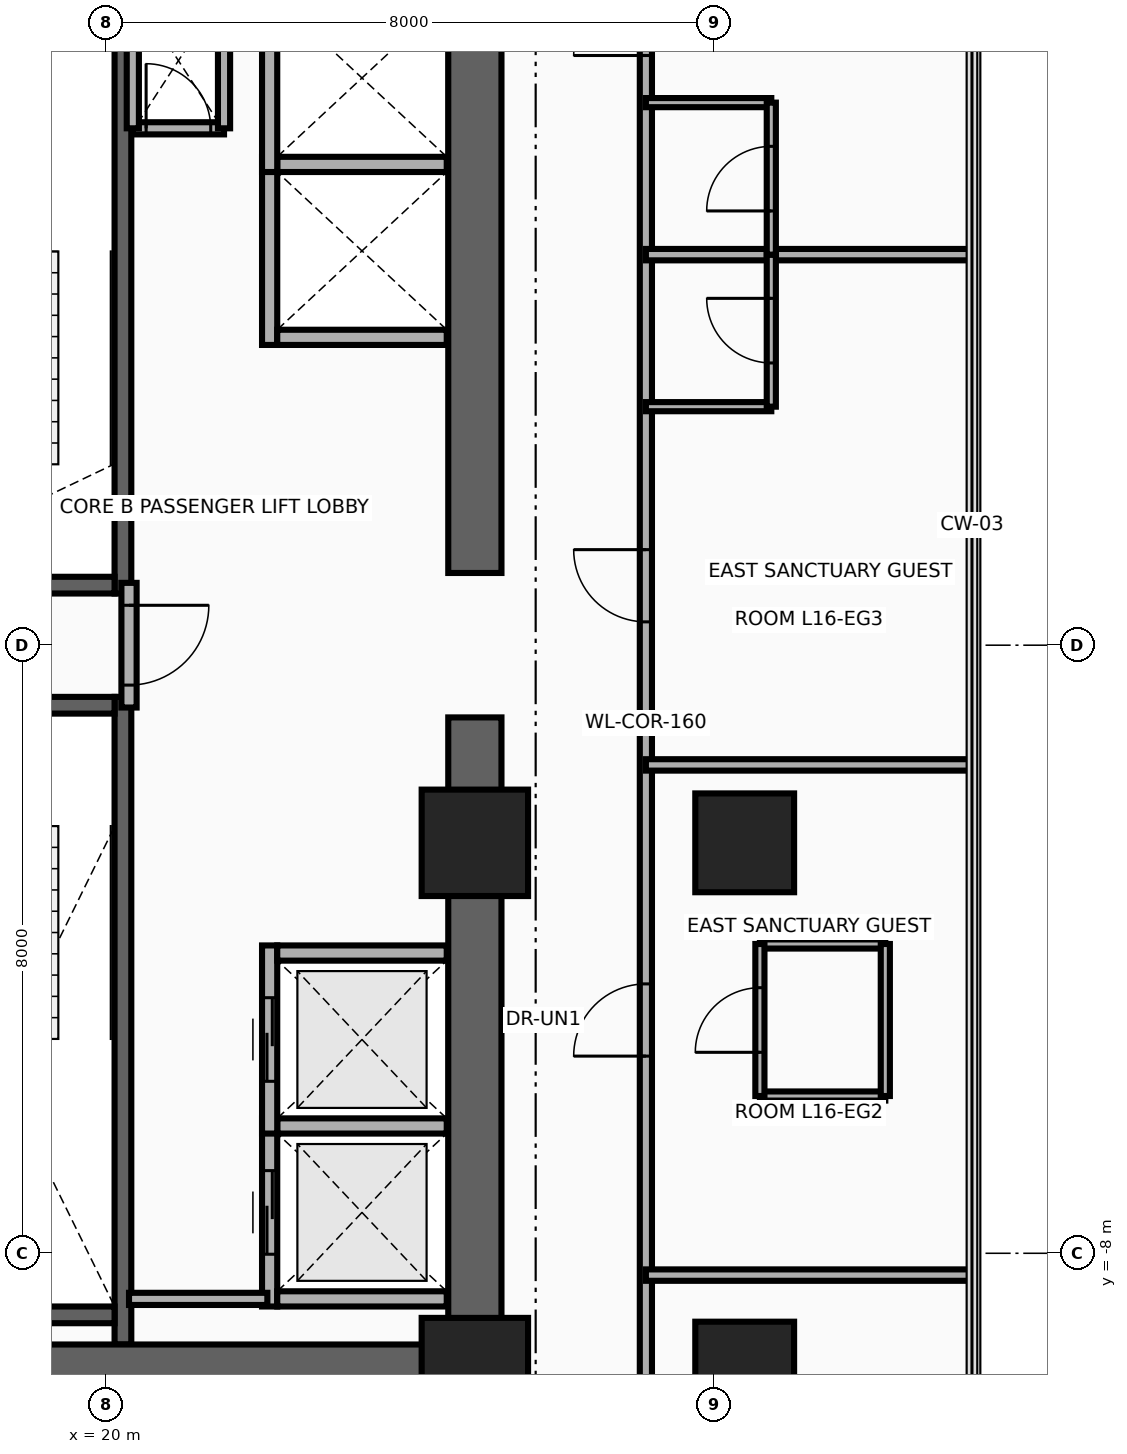
"""IFC4 building model, lengths in metres.
Left out: names, types, materials, properties, quantities, classifications, styles, units other than length and angle.
Written with IfcOpenShell. Run it as: python <this file> out.ifc"""

import sys

from ifc_helpers import new_model, si_unit, direction, frame, frame_2d, origin, origin_2d, place, context, subcontext, project, spatial, rectangle, circle, extrude, source, transform, mapped, element, fill, save


model = new_model("IFC4")
c1 = context("Model", 3, precision=1e-05, world=origin(), true_north=direction((0.0, 1.0)))
c2 = subcontext(c1, "Body", "Model", "MODEL_VIEW")
j1 = project(units=[si_unit("LENGTHUNIT", "METRE"), si_unit("PLANEANGLEUNIT", "RADIAN")], contexts=[c1])
p1 = place(None, origin())
s1 = spatial("IfcSite", under=j1, at=p1, CompositionType="ELEMENT")
p2 = place(p1, origin())
s2 = spatial("IfcBuilding", under=s1, at=p2, CompositionType="ELEMENT")
p3 = place(p2, frame((0.0, 0.0, 66.7)))
s3 = spatial("IfcBuildingStorey", under=s2, at=p3, CompositionType="ELEMENT", Elevation=66.7)
p4 = place(p3, frame((20.22, 0.68, 0.0), z_axis=(0.0, 0.0, 1.0), x_axis=(0.0, 1.0, 0.0)))
e1 = element("IfcWall", 1, at=p4, inside=s3, PredefinedType="SHEAR", context=c2, shape_type="SweptSolid", body=[
    extrude(rectangle(XDim=8.52, YDim=0.22, at=frame_2d((4.26, 0.0))), origin(), (0.0, 0.0, 1.0), 3.46),
])
p5 = place(p3, frame((17.0, 0.79, 0.0), z_axis=(0.0, 0.0, 1.0), x_axis=(1.0, 0.0, 0.0)))
e2 = element("IfcWall", 2, at=p5, inside=s3, PredefinedType="SHEAR", context=c2, shape_type="SweptSolid", body=[
    extrude(rectangle(XDim=3.11, YDim=0.22, at=frame_2d((1.555, 0.0))), origin(), (0.0, 0.0, 1.0), 3.46),
])
p6 = place(p5, frame((0.95, 0.0, 0.0)))
e3 = element("IfcOpeningElement", 3, at=p6, cuts=e2, PredefinedType="OPENING", context=c2, shape_type="SweptSolid", body=[
    extrude(rectangle(XDim=1.1, YDim=2.15, at=frame_2d((0.55, 1.075))), frame((0.0, 0.125, 0.0), z_axis=(0.0, -1.0, 0.0), x_axis=(1.0, 0.0, 0.0)), (0.0, 0.0, 1.0), 0.25),
])
p7 = place(p3, frame((20.22, -9.2, 0.0), z_axis=(0.0, 0.0, 1.0), x_axis=(0.0, 1.0, 0.0)))
e4 = element("IfcWall", 4, at=p7, inside=s3, PredefinedType="SHEAR", context=c2, shape_type="SweptSolid", body=[
    extrude(rectangle(XDim=8.52, YDim=0.22, at=frame_2d((4.26, 0.0))), origin(), (0.0, 0.0, 1.0), 3.46),
])
p8 = place(p3, frame((17.0, -8.81, 0.0), z_axis=(0.0, 0.0, 1.0), x_axis=(1.0, 0.0, 0.0)))
e5 = element("IfcWall", 5, at=p8, inside=s3, PredefinedType="SHEAR", context=c2, shape_type="SweptSolid", body=[
    extrude(rectangle(XDim=3.11, YDim=0.22, at=frame_2d((1.555, 0.0))), origin(), (0.0, 0.0, 1.0), 3.46),
])
p9 = place(p3, frame((17.0, -0.79, 0.0), z_axis=(0.0, 0.0, 1.0), x_axis=(1.0, 0.0, 0.0)))
e6 = element("IfcWall", 6, at=p9, inside=s3, PredefinedType="SHEAR", context=c2, shape_type="SweptSolid", body=[
    extrude(rectangle(XDim=3.11, YDim=0.22, at=frame_2d((1.555, 0.0))), origin(), (0.0, 0.0, 1.0), 3.46),
])
p10 = place(p9, frame((0.95, 0.0, 0.0)))
e7 = element("IfcOpeningElement", 7, at=p10, cuts=e6, PredefinedType="OPENING", context=c2, shape_type="SweptSolid", body=[
    extrude(rectangle(XDim=1.1, YDim=2.15, at=frame_2d((0.55, 1.075))), frame((0.0, 0.125, 0.0), z_axis=(0.0, -1.0, 0.0), x_axis=(1.0, 0.0, 0.0)), (0.0, 0.0, 1.0), 0.25),
])
for number, where, z_axis, x_axis in (
    (8, (24.85, -9.9, 0.0), (0.0, 0.0, 1.0), (0.0, 1.0, 0.0)),
    (9, (24.85, 0.95, 0.0), (0.0, 0.0, 1.0), (0.0, 1.0, 0.0)),
):
    element("IfcWall", number, at=place(p3, frame(where, z_axis=z_axis, x_axis=x_axis)), inside=s3, PredefinedType="SHEAR", context=c2, shape_type="SweptSolid", body=[
        extrude(rectangle(XDim=8.95, YDim=0.7, at=frame_2d((4.475, 0.0))), origin(), (0.0, 0.0, 1.0), 3.46),
    ])
p11 = place(p3, frame((15.85, -9.55, 0.0), z_axis=(0.0, 0.0, 1.0), x_axis=(1.0, 0.0, 0.0)))
e10 = element("IfcWall", 10, at=p11, inside=s3, PredefinedType="SHEAR", context=c2, shape_type="SweptSolid", body=[
    extrude(rectangle(XDim=9.0, YDim=0.7, at=frame_2d((4.5, 0.0))), origin(), (0.0, 0.0, 1.0), 3.46),
])
m1 = source(origin(), c2, "Body", "SweptSolid", [
    extrude(rectangle(XDim=1.4, YDim=1.4, at=origin_2d()), origin(), (0.0, 0.0, 1.0), 3.7),
])
p12 = place(p3, frame((24.85, -9.55, 0.0), z_axis=(0.0, 0.0, 1.0), x_axis=(1.0, 0.0, 0.0)))
e11 = element("IfcColumn", 11, at=p12, inside=s3, PredefinedType="COLUMN", context=c2, shape_type="MappedRepresentation", body=[
    mapped(m1, transform((0.0, 0.0, 0.0), x_axis=(1.0, 0.0, 0.0), y_axis=(0.0, 1.0, 0.0), z_axis=(0.0, 0.0, 1.0), scale=1.0)),
])
m2 = source(origin(), c2, "Body", "SweptSolid", [
    extrude(circle(Radius=0.65, at=origin_2d()), origin(), (0.0, 0.0, 1.0), 3.7),
])
p13 = place(p3, frame((28.4, -9.55, 0.0), z_axis=(0.0, 0.0, 1.0), x_axis=(1.0, 0.0, 0.0)))
e12 = element("IfcColumn", 12, at=p13, inside=s3, PredefinedType="COLUMN", context=c2, shape_type="MappedRepresentation", body=[
    mapped(m2, transform((0.0, 0.0, 0.0), x_axis=(1.0, 0.0, 0.0), y_axis=(0.0, 1.0, 0.0), z_axis=(0.0, 0.0, 1.0), scale=1.0)),
])
p14 = place(p3, frame((24.85, -2.6, 0.0), z_axis=(0.0, 0.0, 1.0), x_axis=(1.0, 0.0, 0.0)))
e13 = element("IfcColumn", 13, at=p14, inside=s3, PredefinedType="COLUMN", context=c2, shape_type="MappedRepresentation", body=[
    mapped(m1, transform((0.0, 0.0, 0.0), x_axis=(1.0, 0.0, 0.0), y_axis=(0.0, 1.0, 0.0), z_axis=(0.0, 0.0, 1.0), scale=1.0)),
])
p15 = place(p3, frame((28.4, -2.6, 0.0), z_axis=(0.0, 0.0, 1.0), x_axis=(1.0, 0.0, 0.0)))
e14 = element("IfcColumn", 14, at=p15, inside=s3, PredefinedType="COLUMN", context=c2, shape_type="MappedRepresentation", body=[
    mapped(m2, transform((0.0, 0.0, 0.0), x_axis=(1.0, 0.0, 0.0), y_axis=(0.0, 1.0, 0.0), z_axis=(0.0, 0.0, 1.0), scale=1.0)),
])
p16 = place(p3, frame((22.15, -8.7, 0.0), z_axis=(0.0, 0.0, 1.0), x_axis=(0.0, 1.0, 0.0)))
e15 = element("IfcWall", 15, at=p16, inside=s3, PredefinedType="MOVABLE", context=c2, shape_type="SweptSolid", body=[
    extrude(rectangle(XDim=2.475, YDim=0.2, at=frame_2d((1.237, 0.0))), origin(), (0.0, 0.0, 1.0), 3.46),
])
p17 = place(p16, frame((0.688, 0.0, 0.0)))
e16 = element("IfcOpeningElement", 16, at=p17, cuts=e15, PredefinedType="OPENING", context=c2, shape_type="SweptSolid", body=[
    extrude(rectangle(XDim=1.1, YDim=2.1, at=frame_2d((0.55, 1.05))), frame((0.0, 0.115, 0.0), z_axis=(0.0, -1.0, 0.0), x_axis=(1.0, 0.0, 0.0)), (0.0, 0.0, 1.0), 0.23),
])
for number, where, z_axis, x_axis in (
    (17, (22.25, -8.6, 0.0), (0.0, 0.0, 1.0), (1.0, 0.0, 0.0)),
    (18, (22.25, -6.325, 0.0), (0.0, 0.0, 1.0), (1.0, 0.0, 0.0)),
):
    element("IfcWall", number, at=place(p3, frame(where, z_axis=z_axis, x_axis=x_axis)), inside=s3, PredefinedType="MOVABLE", context=c2, shape_type="SweptSolid", body=[
        extrude(rectangle(XDim=2.23, YDim=0.2, at=frame_2d((1.115, 0.0))), origin(), (0.0, 0.0, 1.0), 3.46),
    ])
p18 = place(p3, frame((22.15, -6.425, 0.0), z_axis=(0.0, 0.0, 1.0), x_axis=(0.0, 1.0, 0.0)))
e19 = element("IfcWall", 19, at=p18, inside=s3, PredefinedType="MOVABLE", context=c2, shape_type="SweptSolid", body=[
    extrude(rectangle(XDim=2.475, YDim=0.2, at=frame_2d((1.238, 0.0))), origin(), (0.0, 0.0, 1.0), 3.46),
])
p19 = place(p18, frame((0.688, 0.0, 0.0)))
e20 = element("IfcOpeningElement", 20, at=p19, cuts=e19, PredefinedType="OPENING", context=c2, shape_type="SweptSolid", body=[
    extrude(rectangle(XDim=1.1, YDim=2.1, at=frame_2d((0.55, 1.05))), frame((0.0, 0.115, 0.0), z_axis=(0.0, -1.0, 0.0), x_axis=(1.0, 0.0, 0.0)), (0.0, 0.0, 1.0), 0.23),
])
p20 = place(p3, frame((22.25, -4.05, 0.0), z_axis=(0.0, 0.0, 1.0), x_axis=(1.0, 0.0, 0.0)))
e21 = element("IfcWall", 21, at=p20, inside=s3, PredefinedType="MOVABLE", context=c2, shape_type="SweptSolid", body=[
    extrude(rectangle(XDim=2.23, YDim=0.2, at=frame_2d((1.115, 0.0))), origin(), (0.0, 0.0, 1.0), 3.46),
])
p21 = place(p3, frame((22.15, 3.95, 0.0), z_axis=(0.0, 0.0, 1.0), x_axis=(0.0, 1.0, 0.0)))
e22 = element("IfcWall", 22, at=p21, inside=s3, PredefinedType="MOVABLE", context=c2, shape_type="SweptSolid", body=[
    extrude(rectangle(XDim=2.475, YDim=0.2, at=frame_2d((1.238, 0.0))), origin(), (0.0, 0.0, 1.0), 3.46),
])
for number, where, z_axis, x_axis in (
    (23, (22.25, 4.05, 0.0), (0.0, 0.0, 1.0), (1.0, 0.0, 0.0)),
    (24, (22.25, 6.325, 0.0), (0.0, 0.0, 1.0), (1.0, 0.0, 0.0)),
):
    element("IfcWall", number, at=place(p3, frame(where, z_axis=z_axis, x_axis=x_axis)), inside=s3, PredefinedType="MOVABLE", context=c2, shape_type="SweptSolid", body=[
        extrude(rectangle(XDim=2.23, YDim=0.2, at=frame_2d((1.115, 0.0))), origin(), (0.0, 0.0, 1.0), 2.245),
    ])
p22 = place(p3, frame((22.15, 6.225, 0.0), z_axis=(0.0, 0.0, 1.0), x_axis=(0.0, 1.0, 0.0)))
e25 = element("IfcWall", 25, at=p22, inside=s3, PredefinedType="MOVABLE", context=c2, shape_type="SweptSolid", body=[
    extrude(rectangle(XDim=2.475, YDim=0.2, at=frame_2d((1.237, 0.0))), origin(), (0.0, 0.0, 1.0), 3.46),
])
p23 = place(p3, frame((20.3, -0.82, 0.0), z_axis=(0.0, 0.0, 1.0), x_axis=(0.0, 1.0, 0.0)))
e26 = element("IfcWall", 26, at=p23, inside=s3, PredefinedType="PARTITIONING", context=c2, shape_type="SweptSolid", body=[
    extrude(rectangle(XDim=1.64, YDim=0.2, at=frame_2d((0.82, 0.0))), origin(), (0.0, 0.0, 1.0), 3.46),
])
p24 = place(p23, frame((0.295, 0.0, 0.0)))
e27 = element("IfcOpeningElement", 27, at=p24, cuts=e26, PredefinedType="OPENING", context=c2, shape_type="SweptSolid", body=[
    extrude(rectangle(XDim=1.05, YDim=2.15, at=frame_2d((0.525, 1.075))), frame((0.0, 0.115, 0.0), z_axis=(0.0, -1.0, 0.0), x_axis=(1.0, 0.0, 0.0)), (0.0, 0.0, 1.0), 0.23),
])
p25 = place(p3, frame((20.35, 6.8, 0.0), z_axis=(0.0, 0.0, 1.0), x_axis=(1.0, 0.0, 0.0)))
e28 = element("IfcWall", 28, at=p25, inside=s3, PredefinedType="PARTITIONING", context=c2, shape_type="SweptSolid", body=[
    extrude(rectangle(XDim=1.2, YDim=0.16, at=frame_2d((0.6, 0.0))), origin(), (0.0, 0.0, 1.0), 3.46),
])
p26 = place(p25, frame((0.175, 0.0, 0.0)))
e29 = element("IfcOpeningElement", 29, at=p26, cuts=e28, PredefinedType="OPENING", context=c2, shape_type="SweptSolid", body=[
    extrude(rectangle(XDim=0.85, YDim=2.05, at=frame_2d((0.425, 1.025))), frame((0.0, 0.095, 0.0), z_axis=(0.0, -1.0, 0.0), x_axis=(1.0, 0.0, 0.0)), (0.0, 0.0, 1.0), 0.19),
])
for number, where, z_axis, x_axis in (
    (30, (21.55, 6.8, 0.0), (0.0, 0.0, 1.0), (0.0, 1.0, 0.0)),
    (31, (20.35, 6.8, 0.0), (0.0, 0.0, 1.0), (0.0, 1.0, 0.0)),
):
    element("IfcWall", number, at=place(p3, frame(where, z_axis=z_axis, x_axis=x_axis)), inside=s3, PredefinedType="PARTITIONING", context=c2, shape_type="SweptSolid", body=[
        extrude(rectangle(XDim=1.8, YDim=0.16, at=frame_2d((0.9, 0.0))), origin(), (0.0, 0.0, 1.0), 3.46),
    ])
p27 = place(p3, frame((20.3, -8.6, 0.0), z_axis=(0.0, 0.0, 1.0), x_axis=(1.0, 0.0, 0.0)))
e32 = element("IfcWall", 32, at=p27, inside=s3, PredefinedType="PARTITIONING", context=c2, shape_type="SweptSolid", body=[
    extrude(rectangle(XDim=1.82, YDim=0.16, at=frame_2d((0.91, 0.0))), origin(), (0.0, 0.0, 1.0), 3.46),
])
p28 = place(p3, frame((27.1, -13.89, 0.0), z_axis=(0.0, 0.0, 1.0), x_axis=(0.0, 1.0, 0.0)))
e33 = element("IfcWall", 33, at=p28, inside=s3, PredefinedType="PARTITIONING", context=c2, shape_type="SweptSolid", body=[
    extrude(rectangle(XDim=25.74, YDim=0.16, at=frame_2d((12.87, 0.0))), origin(), (0.0, 0.0, 1.0), 2.583),
])
p29 = place(p28, frame((2.62, 0.0, 0.0)))
e34 = element("IfcOpeningElement", 34, at=p29, cuts=e33, PredefinedType="OPENING", context=c2, shape_type="SweptSolid", body=[
    extrude(rectangle(XDim=0.95, YDim=2.15, at=frame_2d((0.475, 1.075))), frame((0.0, 0.095, 0.0), z_axis=(0.0, -1.0, 0.0), x_axis=(1.0, 0.0, 0.0)), (0.0, 0.0, 1.0), 0.19),
])
p30 = place(p28, frame((8.484, 0.0, 0.0)))
e35 = element("IfcOpeningElement", 35, at=p30, cuts=e33, PredefinedType="OPENING", context=c2, shape_type="SweptSolid", body=[
    extrude(rectangle(XDim=0.95, YDim=2.15, at=frame_2d((0.475, 1.075))), frame((0.0, 0.095, 0.0), z_axis=(0.0, -1.0, 0.0), x_axis=(1.0, 0.0, 0.0)), (0.0, 0.0, 1.0), 0.19),
])
p31 = place(p28, frame((14.197, 0.0, 0.0)))
e36 = element("IfcOpeningElement", 36, at=p31, cuts=e33, PredefinedType="OPENING", context=c2, shape_type="SweptSolid", body=[
    extrude(rectangle(XDim=0.95, YDim=2.15, at=frame_2d((0.475, 1.075))), frame((0.0, 0.095, 0.0), z_axis=(0.0, -1.0, 0.0), x_axis=(1.0, 0.0, 0.0)), (0.0, 0.0, 1.0), 0.19),
])
p32 = place(p28, frame((21.648, 0.0, 0.0)))
e37 = element("IfcOpeningElement", 37, at=p32, cuts=e33, PredefinedType="OPENING", context=c2, shape_type="SweptSolid", body=[
    extrude(rectangle(XDim=0.95, YDim=2.15, at=frame_2d((0.475, 1.075))), frame((0.0, 0.095, 0.0), z_axis=(0.0, -1.0, 0.0), x_axis=(1.0, 0.0, 0.0)), (0.0, 0.0, 1.0), 0.19),
])
for number, where, z_axis, x_axis in (
    (38, (27.1, -8.287, 0.0), (0.0, 0.0, 1.0), (1.0, 0.0, 0.0)),
    (39, (27.1, -1.575, 0.0), (0.0, 0.0, 1.0), (1.0, 0.0, 0.0)),
    (40, (27.1, 5.138, 0.0), (0.0, 0.0, 1.0), (1.0, 0.0, 0.0)),
):
    element("IfcWall", number, at=place(p3, frame(where, z_axis=z_axis, x_axis=x_axis)), inside=s3, PredefinedType="PARTITIONING", context=c2, shape_type="SweptSolid", body=[
        extrude(rectangle(XDim=4.29, YDim=0.15, at=frame_2d((2.145, 0.0))), origin(), (0.0, 0.0, 1.0), 2.896),
    ])
for number, where, z_axis, x_axis in (
    (41, (28.6, -5.931, 0.0), (0.0, 0.0, 1.0), (1.0, 0.0, 0.0)),
    (42, (28.6, -3.931, 0.0), (0.0, 0.0, 1.0), (1.0, 0.0, 0.0)),
):
    element("IfcWall", number, at=place(p3, frame(where, z_axis=z_axis, x_axis=x_axis)), inside=s3, PredefinedType="PARTITIONING", context=c2, shape_type="SweptSolid", body=[
        extrude(rectangle(XDim=1.65, YDim=0.12, at=frame_2d((0.825, 0.0))), origin(), (0.0, 0.0, 1.0), 3.46),
    ])
p33 = place(p3, frame((30.25, -5.931, 0.0), z_axis=(0.0, 0.0, 1.0), x_axis=(0.0, 1.0, 0.0)))
e43 = element("IfcWall", 43, at=p33, inside=s3, PredefinedType="PARTITIONING", context=c2, shape_type="SweptSolid", body=[
    extrude(rectangle(XDim=2.0, YDim=0.12, at=frame_2d((1.0, 0.0))), origin(), (0.0, 0.0, 1.0), 3.46),
])
p34 = place(p3, frame((28.6, -5.931, 0.0), z_axis=(0.0, 0.0, 1.0), x_axis=(0.0, 1.0, 0.0)))
e44 = element("IfcWall", 44, at=p34, inside=s3, PredefinedType="PARTITIONING", context=c2, shape_type="SweptSolid", body=[
    extrude(rectangle(XDim=2.0, YDim=0.12, at=frame_2d((1.0, 0.0))), origin(), (0.0, 0.0, 1.0), 3.46),
])
p35 = place(p34, frame((0.575, 0.0, 0.0)))
e45 = element("IfcOpeningElement", 45, at=p35, cuts=e44, PredefinedType="OPENING", context=c2, shape_type="SweptSolid", body=[
    extrude(rectangle(XDim=0.85, YDim=2.1, at=frame_2d((0.425, 1.05))), frame((0.0, 0.075, 0.0), z_axis=(0.0, -1.0, 0.0), x_axis=(1.0, 0.0, 0.0)), (0.0, 0.0, 1.0), 0.15),
])
p36 = place(p3, frame((27.1, 3.138, 0.0), z_axis=(0.0, 0.0, 1.0), x_axis=(1.0, 0.0, 0.0)))
e46 = element("IfcWall", 46, at=p36, inside=s3, PredefinedType="PARTITIONING", context=c2, shape_type="SweptSolid", body=[
    extrude(rectangle(XDim=1.65, YDim=0.12, at=frame_2d((0.825, 0.0))), origin(), (0.0, 0.0, 1.0), 2.896),
])
p37 = place(p3, frame((28.75, 3.138, 0.0), z_axis=(0.0, 0.0, 1.0), x_axis=(0.0, 1.0, 0.0)))
e47 = element("IfcWall", 47, at=p37, inside=s3, PredefinedType="PARTITIONING", context=c2, shape_type="SweptSolid", body=[
    extrude(rectangle(XDim=2.0, YDim=0.12, at=frame_2d((1.0, 0.0))), origin(), (0.0, 0.0, 1.0), 3.46),
])
p38 = place(p37, frame((0.575, 0.0, 0.0)))
e48 = element("IfcOpeningElement", 48, at=p38, cuts=e47, PredefinedType="OPENING", context=c2, shape_type="SweptSolid", body=[
    extrude(rectangle(XDim=0.85, YDim=2.1, at=frame_2d((0.425, 1.05))), frame((0.0, 0.075, 0.0), z_axis=(0.0, -1.0, 0.0), x_axis=(1.0, 0.0, 0.0)), (0.0, 0.0, 1.0), 0.15),
])
p39 = place(p3, frame((27.1, 7.138, 0.0), z_axis=(0.0, 0.0, 1.0), x_axis=(1.0, 0.0, 0.0)))
e49 = element("IfcWall", 49, at=p39, inside=s3, PredefinedType="PARTITIONING", context=c2, shape_type="SweptSolid", body=[
    extrude(rectangle(XDim=1.65, YDim=0.12, at=frame_2d((0.825, 0.0))), origin(), (0.0, 0.0, 1.0), 2.896),
])
p40 = place(p3, frame((28.75, 5.138, 0.0), z_axis=(0.0, 0.0, 1.0), x_axis=(0.0, 1.0, 0.0)))
e50 = element("IfcWall", 50, at=p40, inside=s3, PredefinedType="PARTITIONING", context=c2, shape_type="SweptSolid", body=[
    extrude(rectangle(XDim=2.0, YDim=0.12, at=frame_2d((1.0, 0.0))), origin(), (0.0, 0.0, 1.0), 3.46),
])
p41 = place(p40, frame((0.575, 0.0, 0.0)))
e51 = element("IfcOpeningElement", 51, at=p41, cuts=e50, PredefinedType="OPENING", context=c2, shape_type="SweptSolid", body=[
    extrude(rectangle(XDim=0.85, YDim=2.1, at=frame_2d((0.425, 1.05))), frame((0.0, 0.075, 0.0), z_axis=(0.0, -1.0, 0.0), x_axis=(1.0, 0.0, 0.0)), (0.0, 0.0, 1.0), 0.15),
])
p42 = place(p17, origin())
e52 = element("IfcDoor", 52, at=p42, inside=s3, OperationType="DOUBLE_DOOR_SLIDING", PredefinedType="DOOR", context=c2, shape_type="SweptSolid", body=[
    extrude(rectangle(XDim=1.1, YDim=2.1, at=frame_2d((0.55, 1.05))), frame((0.0, 0.025, 0.0), z_axis=(0.0, -1.0, 0.0), x_axis=(1.0, 0.0, 0.0)), (0.0, 0.0, 1.0), 0.05),
])
fill(e16, e52)
p43 = place(p19, origin())
e53 = element("IfcDoor", 53, at=p43, inside=s3, OperationType="DOUBLE_DOOR_SLIDING", PredefinedType="DOOR", context=c2, shape_type="SweptSolid", body=[
    extrude(rectangle(XDim=1.1, YDim=2.1, at=frame_2d((0.55, 1.05))), frame((0.0, 0.025, 0.0), z_axis=(0.0, -1.0, 0.0), x_axis=(1.0, 0.0, 0.0)), (0.0, 0.0, 1.0), 0.05),
])
fill(e20, e53)
p44 = place(p24, frame((1.05, 0.0, 0.0), z_axis=(0.0, 0.0, 1.0), x_axis=(-1.0, 0.0, 0.0)))
e54 = element("IfcDoor", 54, at=p44, inside=s3, OperationType="SINGLE_SWING_LEFT", PredefinedType="DOOR", context=c2, shape_type="SweptSolid", body=[
    extrude(rectangle(XDim=1.05, YDim=2.15, at=frame_2d((0.525, 1.075))), frame((0.0, 0.025, 0.0), z_axis=(0.0, -1.0, 0.0), x_axis=(1.0, 0.0, 0.0)), (0.0, 0.0, 1.0), 0.05),
])
fill(e27, e54)
p45 = place(p26, origin())
e55 = element("IfcDoor", 55, at=p45, inside=s3, OperationType="SINGLE_SWING_RIGHT", PredefinedType="DOOR", context=c2, shape_type="SweptSolid", body=[
    extrude(rectangle(XDim=0.85, YDim=2.05, at=frame_2d((0.425, 1.025))), frame((0.0, 0.025, 0.0), z_axis=(0.0, -1.0, 0.0), x_axis=(1.0, 0.0, 0.0)), (0.0, 0.0, 1.0), 0.05),
])
fill(e29, e55)
p46 = place(p30, origin())
e56 = element("IfcDoor", 56, at=p46, inside=s3, OperationType="SINGLE_SWING_RIGHT", PredefinedType="DOOR", context=c2, shape_type="SweptSolid", body=[
    extrude(rectangle(XDim=0.95, YDim=2.15, at=frame_2d((0.475, 1.075))), frame((0.0, 0.025, 0.0), z_axis=(0.0, -1.0, 0.0), x_axis=(1.0, 0.0, 0.0)), (0.0, 0.0, 1.0), 0.05),
])
fill(e35, e56)
p47 = place(p35, origin())
e57 = element("IfcDoor", 57, at=p47, inside=s3, OperationType="SINGLE_SWING_LEFT", PredefinedType="DOOR", context=c2, shape_type="SweptSolid", body=[
    extrude(rectangle(XDim=0.85, YDim=2.1, at=frame_2d((0.425, 1.05))), frame((0.0, 0.025, 0.0), z_axis=(0.0, -1.0, 0.0), x_axis=(1.0, 0.0, 0.0)), (0.0, 0.0, 1.0), 0.05),
])
fill(e45, e57)
p48 = place(p31, origin())
e58 = element("IfcDoor", 58, at=p48, inside=s3, OperationType="SINGLE_SWING_RIGHT", PredefinedType="DOOR", context=c2, shape_type="SweptSolid", body=[
    extrude(rectangle(XDim=0.95, YDim=2.15, at=frame_2d((0.475, 1.075))), frame((0.0, 0.025, 0.0), z_axis=(0.0, -1.0, 0.0), x_axis=(1.0, 0.0, 0.0)), (0.0, 0.0, 1.0), 0.05),
])
fill(e36, e58)
p49 = place(p38, origin())
e59 = element("IfcDoor", 59, at=p49, inside=s3, OperationType="SINGLE_SWING_LEFT", PredefinedType="DOOR", context=c2, shape_type="SweptSolid", body=[
    extrude(rectangle(XDim=0.85, YDim=2.1, at=frame_2d((0.425, 1.05))), frame((0.0, 0.025, 0.0), z_axis=(0.0, -1.0, 0.0), x_axis=(1.0, 0.0, 0.0)), (0.0, 0.0, 1.0), 0.05),
])
fill(e48, e59)
p50 = place(p32, origin())
e60 = element("IfcDoor", 60, at=p50, inside=s3, OperationType="SINGLE_SWING_RIGHT", PredefinedType="DOOR", context=c2, shape_type="SweptSolid", body=[
    extrude(rectangle(XDim=0.95, YDim=2.15, at=frame_2d((0.475, 1.075))), frame((0.0, 0.025, 0.0), z_axis=(0.0, -1.0, 0.0), x_axis=(1.0, 0.0, 0.0)), (0.0, 0.0, 1.0), 0.05),
])
fill(e37, e60)
p51 = place(p41, origin())
e61 = element("IfcDoor", 61, at=p51, inside=s3, OperationType="SINGLE_SWING_LEFT", PredefinedType="DOOR", context=c2, shape_type="SweptSolid", body=[
    extrude(rectangle(XDim=0.85, YDim=2.1, at=frame_2d((0.425, 1.05))), frame((0.0, 0.025, 0.0), z_axis=(0.0, -1.0, 0.0), x_axis=(1.0, 0.0, 0.0)), (0.0, 0.0, 1.0), 0.05),
])
fill(e51, e61)
save(model, sys.argv[1])
